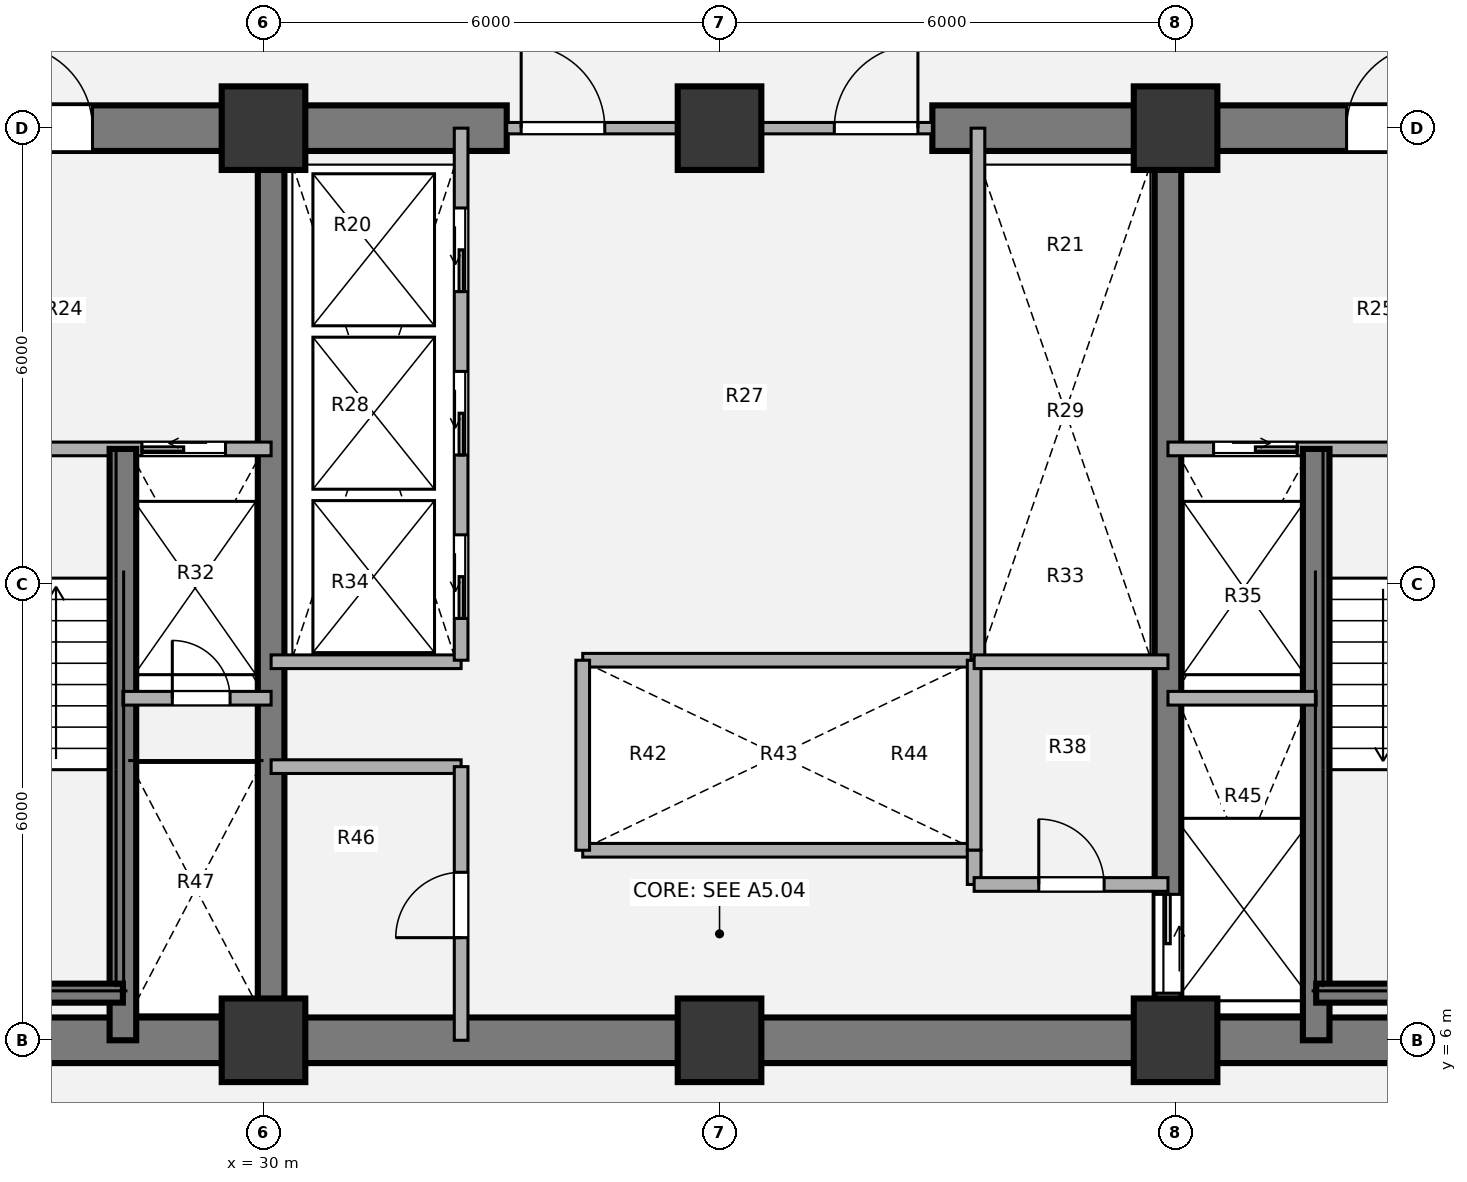
"""IFC4 building model, lengths in metres.
Left out: names, types, materials, properties, quantities, classifications, styles, units other than length and angle.
Written with IfcOpenShell. Run it as: python <this file> out.ifc"""

import sys

from ifc_helpers import new_model, si_unit, direction, frame, frame_2d, origin, origin_2d, place, context, subcontext, project, spatial, rectangle, extrude, source, transform, mapped, element, fill, save


model = new_model("IFC4")
c1 = context("Model", 3, precision=1e-05, world=origin(), true_north=direction((0.0, 1.0)))
c2 = subcontext(c1, "Body", "Model", "MODEL_VIEW")
j1 = project(units=[si_unit("LENGTHUNIT", "METRE"), si_unit("PLANEANGLEUNIT", "RADIAN")], contexts=[c1])
p1 = place(None, origin())
s1 = spatial("IfcSite", under=j1, at=p1, CompositionType="ELEMENT")
p2 = place(p1, origin())
s2 = spatial("IfcBuilding", under=s1, at=p2, CompositionType="ELEMENT")
p3 = place(p2, frame((0.0, 0.0, 38.34)))
s3 = spatial("IfcBuildingStorey", under=s2, at=p3, CompositionType="ELEMENT", Elevation=38.34)
m1 = source(origin(), c2, "Body", "SweptSolid", [
    extrude(rectangle(XDim=1.1, YDim=1.1, at=origin_2d()), origin(), (0.0, 0.0, 1.0), 3.78),
])
for number, where, z_axis, x_axis in (
    (1, (30.0, 6.0, 0.0), (0.0, 0.0, 1.0), (1.0, 0.0, 0.0)),
    (2, (36.0, 6.0, 0.0), (0.0, 0.0, 1.0), (1.0, 0.0, 0.0)),
    (3, (42.0, 6.0, 0.0), (0.0, 0.0, 1.0), (1.0, 0.0, 0.0)),
    (4, (30.0, 18.0, 0.0), (0.0, 0.0, 1.0), (1.0, 0.0, 0.0)),
    (5, (36.0, 18.0, 0.0), (0.0, 0.0, 1.0), (1.0, 0.0, 0.0)),
    (6, (42.0, 18.0, 0.0), (0.0, 0.0, 1.0), (1.0, 0.0, 0.0)),
):
    element("IfcColumn", number, at=place(p3, frame(where, z_axis=z_axis, x_axis=x_axis)), inside=s3, PredefinedType="COLUMN", context=c2, shape_type="MappedRepresentation", body=[
        mapped(m1, transform((0.0, 0.0, 0.0), x_axis=(1.0, 0.0, 0.0), y_axis=(0.0, 1.0, 0.0), z_axis=(0.0, 0.0, 1.0), scale=1.0)),
    ])
p4 = place(p3, frame((48.3, 6.0, 0.0), z_axis=(0.0, 0.0, 1.0), x_axis=(-1.0, 0.0, 0.0)))
e7 = element("IfcWall", 7, at=p4, inside=s3, PredefinedType="SHEAR", context=c2, shape_type="SweptSolid", body=[
    extrude(rectangle(XDim=24.6, YDim=0.6, at=frame_2d((12.3, 0.0))), origin(), (0.0, 0.0, 1.0), 3.78),
])
p5 = place(p3, frame((23.7, 18.0, 0.0), z_axis=(0.0, 0.0, 1.0), x_axis=(1.0, 0.0, 0.0)))
e8 = element("IfcWall", 8, at=p5, inside=s3, PredefinedType="SHEAR", context=c2, shape_type="SweptSolid", body=[
    extrude(rectangle(XDim=9.5, YDim=0.6, at=frame_2d((4.75, 0.0))), origin(), (0.0, 0.0, 1.0), 3.78),
])
p6 = place(p5, frame((2.95, 0.0, 0.0)))
e9 = element("IfcOpeningElement", 9, at=p6, cuts=e8, PredefinedType="OPENING", context=c2, shape_type="SweptSolid", body=[
    extrude(rectangle(XDim=1.1, YDim=2.1, at=origin_2d()), frame((0.55, 0.31, 1.05), z_axis=(0.0, -1.0, 0.0), x_axis=(1.0, 0.0, 0.0)), (0.0, 0.0, 1.0), 0.62),
])
p7 = place(p3, frame((38.8, 18.0, 0.0), z_axis=(0.0, 0.0, 1.0), x_axis=(1.0, 0.0, 0.0)))
e10 = element("IfcWall", 10, at=p7, inside=s3, PredefinedType="SHEAR", context=c2, shape_type="SweptSolid", body=[
    extrude(rectangle(XDim=9.5, YDim=0.6, at=frame_2d((4.75, 0.0))), origin(), (0.0, 0.0, 1.0), 3.78),
])
p8 = place(p7, frame((5.45, 0.0, 0.0)))
e11 = element("IfcOpeningElement", 11, at=p8, cuts=e10, PredefinedType="OPENING", context=c2, shape_type="SweptSolid", body=[
    extrude(rectangle(XDim=1.1, YDim=2.1, at=origin_2d()), frame((0.55, 0.31, 1.05), z_axis=(0.0, -1.0, 0.0), x_axis=(1.0, 0.0, 0.0)), (0.0, 0.0, 1.0), 0.62),
])
p9 = place(p3, frame((30.1, 6.0, 0.0), z_axis=(0.0, 0.0, 1.0), x_axis=(0.0, 1.0, 0.0)))
e12 = element("IfcWall", 12, at=p9, inside=s3, PredefinedType="SHEAR", context=c2, shape_type="SweptSolid", body=[
    extrude(rectangle(XDim=12.0, YDim=0.35, at=frame_2d((6.0, 0.0))), origin(), (0.0, 0.0, 1.0), 3.78),
])
p10 = place(p3, frame((41.9, 18.0, 0.0), z_axis=(0.0, 0.0, 1.0), x_axis=(0.0, -1.0, 0.0)))
e13 = element("IfcWall", 13, at=p10, inside=s3, PredefinedType="SHEAR", context=c2, shape_type="SweptSolid", body=[
    extrude(rectangle(XDim=12.0, YDim=0.35, at=frame_2d((6.0, 0.0))), origin(), (0.0, 0.0, 1.0), 3.78),
])
p11 = place(p10, frame((10.08, 0.0, 0.0)))
e14 = element("IfcOpeningElement", 14, at=p11, cuts=e13, PredefinedType="OPENING", context=c2, shape_type="SweptSolid", body=[
    extrude(rectangle(XDim=1.3, YDim=2.1, at=origin_2d()), frame((0.65, 0.185, 1.05), z_axis=(0.0, -1.0, 0.0), x_axis=(1.0, 0.0, 0.0)), (0.0, 0.0, 1.0), 0.37),
])
for number, where, z_axis, x_axis in (
    (15, (34.2, 11.0, 0.0), (0.0, 0.0, 1.0), (1.0, 0.0, 0.0)),
    (16, (34.2, 8.5, 0.0), (0.0, 0.0, 1.0), (1.0, 0.0, 0.0)),
):
    element("IfcWall", number, at=place(p3, frame(where, z_axis=z_axis, x_axis=x_axis)), inside=s3, PredefinedType="PARTITIONING", context=c2, shape_type="SweptSolid", body=[
        extrude(rectangle(XDim=5.15, YDim=0.18, at=frame_2d((2.575, 0.0))), origin(), (0.0, 0.0, 1.0), 3.5),
    ])
for number, where, z_axis, x_axis in (
    (17, (34.2, 8.5, 0.0), (0.0, 0.0, 1.0), (0.0, 1.0, 0.0)),
    (18, (39.35, 8.5, 0.0), (0.0, 0.0, 1.0), (0.0, 1.0, 0.0)),
):
    element("IfcWall", number, at=place(p3, frame(where, z_axis=z_axis, x_axis=x_axis)), inside=s3, PredefinedType="PARTITIONING", context=c2, shape_type="SweptSolid", body=[
        extrude(rectangle(XDim=2.5, YDim=0.18, at=frame_2d((1.25, 0.0))), origin(), (0.0, 0.0, 1.0), 3.5),
    ])
p12 = place(p3, frame((39.4, 11.0, 0.0), z_axis=(0.0, 0.0, 1.0), x_axis=(0.0, 1.0, 0.0)))
e19 = element("IfcWall", 19, at=p12, inside=s3, PredefinedType="PARTITIONING", context=c2, shape_type="SweptSolid", body=[
    extrude(rectangle(XDim=7.0, YDim=0.18, at=frame_2d((3.5, 0.0))), origin(), (0.0, 0.0, 1.0), 3.5),
])
for number, where, z_axis, x_axis in (
    (20, (30.1, 10.98, 0.0), (0.0, 0.0, 1.0), (1.0, 0.0, 0.0)),
    (21, (30.1, 9.6, 0.0), (0.0, 0.0, 1.0), (1.0, 0.0, 0.0)),
):
    element("IfcWall", number, at=place(p3, frame(where, z_axis=z_axis, x_axis=x_axis)), inside=s3, PredefinedType="PARTITIONING", context=c2, shape_type="SweptSolid", body=[
        extrude(rectangle(XDim=2.5, YDim=0.18, at=frame_2d((1.25, 0.0))), origin(), (0.0, 0.0, 1.0), 3.5),
    ])
p13 = place(p3, frame((32.6, 6.0, 0.0), z_axis=(0.0, 0.0, 1.0), x_axis=(0.0, 1.0, 0.0)))
e22 = element("IfcWall", 22, at=p13, inside=s3, PredefinedType="PARTITIONING", context=c2, shape_type="SweptSolid", body=[
    extrude(rectangle(XDim=3.6, YDim=0.18, at=frame_2d((1.8, 0.0))), origin(), (0.0, 0.0, 1.0), 3.5),
])
p14 = place(p13, frame((1.35, 0.0, 0.0)))
e23 = element("IfcOpeningElement", 23, at=p14, cuts=e22, PredefinedType="OPENING", context=c2, shape_type="SweptSolid", body=[
    extrude(rectangle(XDim=0.86, YDim=2.1, at=origin_2d()), frame((0.43, 0.1, 1.05), z_axis=(0.0, -1.0, 0.0), x_axis=(1.0, 0.0, 0.0)), (0.0, 0.0, 1.0), 0.2),
])
p15 = place(p3, frame((39.35, 10.98, 0.0), z_axis=(0.0, 0.0, 1.0), x_axis=(1.0, 0.0, 0.0)))
e24 = element("IfcWall", 24, at=p15, inside=s3, PredefinedType="PARTITIONING", context=c2, shape_type="SweptSolid", body=[
    extrude(rectangle(XDim=2.55, YDim=0.18, at=frame_2d((1.275, 0.0))), origin(), (0.0, 0.0, 1.0), 3.5),
])
p16 = place(p3, frame((39.35, 8.05, 0.0), z_axis=(0.0, 0.0, 1.0), x_axis=(0.0, 1.0, 0.0)))
e25 = element("IfcWall", 25, at=p16, inside=s3, PredefinedType="PARTITIONING", context=c2, shape_type="SweptSolid", body=[
    extrude(rectangle(XDim=0.45, YDim=0.18, at=frame_2d((0.225, 0.0))), origin(), (0.0, 0.0, 1.0), 3.5),
])
p17 = place(p3, frame((39.35, 8.05, 0.0), z_axis=(0.0, 0.0, 1.0), x_axis=(1.0, 0.0, 0.0)))
e26 = element("IfcWall", 26, at=p17, inside=s3, PredefinedType="PARTITIONING", context=c2, shape_type="SweptSolid", body=[
    extrude(rectangle(XDim=2.55, YDim=0.18, at=frame_2d((1.275, 0.0))), origin(), (0.0, 0.0, 1.0), 3.5),
])
p18 = place(p17, frame((0.85, 0.0, 0.0)))
e27 = element("IfcOpeningElement", 27, at=p18, cuts=e26, PredefinedType="OPENING", context=c2, shape_type="SweptSolid", body=[
    extrude(rectangle(XDim=0.86, YDim=2.1, at=origin_2d()), frame((0.43, 0.1, 1.05), z_axis=(0.0, -1.0, 0.0), x_axis=(1.0, 0.0, 0.0)), (0.0, 0.0, 1.0), 0.2),
])
p19 = place(p3, frame((33.2, 18.0, 0.0), z_axis=(0.0, 0.0, 1.0), x_axis=(1.0, 0.0, 0.0)))
e28 = element("IfcWall", 28, at=p19, inside=s3, PredefinedType="PARTITIONING", context=c2, shape_type="SweptSolid", body=[
    extrude(rectangle(XDim=5.6, YDim=0.15, at=frame_2d((2.8, 0.0))), origin(), (0.0, 0.0, 1.0), 2.315),
])
p20 = place(p19, frame((0.19, 0.0, 0.0)))
e29 = element("IfcOpeningElement", 29, at=p20, cuts=e28, PredefinedType="OPENING", context=c2, shape_type="SweptSolid", body=[
    extrude(rectangle(XDim=1.1, YDim=2.1, at=origin_2d()), frame((0.55, 0.085, 1.05), z_axis=(0.0, -1.0, 0.0), x_axis=(1.0, 0.0, 0.0)), (0.0, 0.0, 1.0), 0.17),
])
p21 = place(p19, frame((4.31, 0.0, 0.0)))
e30 = element("IfcOpeningElement", 30, at=p21, cuts=e28, PredefinedType="OPENING", context=c2, shape_type="SweptSolid", body=[
    extrude(rectangle(XDim=1.1, YDim=2.1, at=origin_2d()), frame((0.55, 0.085, 1.05), z_axis=(0.0, -1.0, 0.0), x_axis=(1.0, 0.0, 0.0)), (0.0, 0.0, 1.0), 0.17),
])
p22 = place(p3, frame((24.0, 13.78, 0.0), z_axis=(0.0, 0.0, 1.0), x_axis=(1.0, 0.0, 0.0)))
e31 = element("IfcWall", 31, at=p22, inside=s3, PredefinedType="PARTITIONING", context=c2, shape_type="SweptSolid", body=[
    extrude(rectangle(XDim=6.1, YDim=0.18, at=frame_2d((3.05, 0.0))), origin(), (0.0, 0.0, 1.0), 3.5),
])
p23 = place(p22, frame((1.15, 0.0, 0.0)))
e32 = element("IfcOpeningElement", 32, at=p23, cuts=e31, PredefinedType="OPENING", context=c2, shape_type="SweptSolid", body=[
    extrude(rectangle(XDim=1.1, YDim=2.1, at=origin_2d()), frame((0.55, 0.1, 1.05), z_axis=(0.0, -1.0, 0.0), x_axis=(1.0, 0.0, 0.0)), (0.0, 0.0, 1.0), 0.2),
])
p24 = place(p22, frame((4.4, 0.0, 0.0)))
e33 = element("IfcOpeningElement", 33, at=p24, cuts=e31, PredefinedType="OPENING", context=c2, shape_type="SweptSolid", body=[
    extrude(rectangle(XDim=1.1, YDim=2.1, at=origin_2d()), frame((0.55, 0.1, 1.05), z_axis=(0.0, -1.0, 0.0), x_axis=(1.0, 0.0, 0.0)), (0.0, 0.0, 1.0), 0.2),
])
p25 = place(p3, frame((28.15, 6.0, 0.0), z_axis=(0.0, 0.0, 1.0), x_axis=(0.0, 1.0, 0.0)))
e34 = element("IfcWall", 34, at=p25, inside=s3, PredefinedType="SHEAR", context=c2, shape_type="SweptSolid", body=[
    extrude(rectangle(XDim=7.78, YDim=0.35, at=frame_2d((3.89, 0.0))), origin(), (0.0, 0.0, 1.0), 3.85),
])
p26 = place(p3, frame((24.58, 6.62, 0.0), z_axis=(0.0, 0.0, 1.0), x_axis=(1.0, 0.0, 0.0)))
e35 = element("IfcWall", 35, at=p26, inside=s3, PredefinedType="SHEAR", context=c2, shape_type="SweptSolid", body=[
    extrude(rectangle(XDim=3.57, YDim=0.25, at=frame_2d((1.785, 0.0))), origin(), (0.0, 0.0, 1.0), 3.85),
])
p27 = place(p3, frame((28.15, 10.5, 0.0), z_axis=(0.0, 0.0, 1.0), x_axis=(1.0, 0.0, 0.0)))
e36 = element("IfcWall", 36, at=p27, inside=s3, PredefinedType="PARTITIONING", context=c2, shape_type="SweptSolid", body=[
    extrude(rectangle(XDim=1.95, YDim=0.18, at=frame_2d((0.975, 0.0))), origin(), (0.0, 0.0, 1.0), 3.5),
])
p28 = place(p27, frame((0.65, 0.0, 0.0)))
e37 = element("IfcOpeningElement", 37, at=p28, cuts=e36, PredefinedType="OPENING", context=c2, shape_type="SweptSolid", body=[
    extrude(rectangle(XDim=0.76, YDim=2.05, at=origin_2d()), frame((0.38, 0.1, 1.025), z_axis=(0.0, -1.0, 0.0), x_axis=(1.0, 0.0, 0.0)), (0.0, 0.0, 1.0), 0.2),
])
p29 = place(p3, frame((41.9, 13.78, 0.0), z_axis=(0.0, 0.0, 1.0), x_axis=(1.0, 0.0, 0.0)))
e38 = element("IfcWall", 38, at=p29, inside=s3, PredefinedType="PARTITIONING", context=c2, shape_type="SweptSolid", body=[
    extrude(rectangle(XDim=6.1, YDim=0.18, at=frame_2d((3.05, 0.0))), origin(), (0.0, 0.0, 1.0), 3.5),
])
p30 = place(p29, frame((0.6, 0.0, 0.0)))
e39 = element("IfcOpeningElement", 39, at=p30, cuts=e38, PredefinedType="OPENING", context=c2, shape_type="SweptSolid", body=[
    extrude(rectangle(XDim=1.1, YDim=2.1, at=origin_2d()), frame((0.55, 0.1, 1.05), z_axis=(0.0, -1.0, 0.0), x_axis=(1.0, 0.0, 0.0)), (0.0, 0.0, 1.0), 0.2),
])
p31 = place(p29, frame((3.8, 0.0, 0.0)))
e40 = element("IfcOpeningElement", 40, at=p31, cuts=e38, PredefinedType="OPENING", context=c2, shape_type="SweptSolid", body=[
    extrude(rectangle(XDim=1.1, YDim=2.1, at=origin_2d()), frame((0.55, 0.1, 1.05), z_axis=(0.0, -1.0, 0.0), x_axis=(1.0, 0.0, 0.0)), (0.0, 0.0, 1.0), 0.2),
])
p32 = place(p3, frame((43.85, 6.0, 0.0), z_axis=(0.0, 0.0, 1.0), x_axis=(0.0, 1.0, 0.0)))
e41 = element("IfcWall", 41, at=p32, inside=s3, PredefinedType="SHEAR", context=c2, shape_type="SweptSolid", body=[
    extrude(rectangle(XDim=7.78, YDim=0.35, at=frame_2d((3.89, 0.0))), origin(), (0.0, 0.0, 1.0), 3.85),
])
p33 = place(p3, frame((43.85, 6.62, 0.0), z_axis=(0.0, 0.0, 1.0), x_axis=(1.0, 0.0, 0.0)))
e42 = element("IfcWall", 42, at=p33, inside=s3, PredefinedType="SHEAR", context=c2, shape_type="SweptSolid", body=[
    extrude(rectangle(XDim=3.57, YDim=0.25, at=frame_2d((1.785, 0.0))), origin(), (0.0, 0.0, 1.0), 3.85),
])
p34 = place(p3, frame((41.9, 10.5, 0.0), z_axis=(0.0, 0.0, 1.0), x_axis=(1.0, 0.0, 0.0)))
e43 = element("IfcWall", 43, at=p34, inside=s3, PredefinedType="PARTITIONING", context=c2, shape_type="SweptSolid", body=[
    extrude(rectangle(XDim=1.95, YDim=0.18, at=frame_2d((0.975, 0.0))), origin(), (0.0, 0.0, 1.0), 3.5),
])
p35 = place(p3, frame((32.6, 11.0, 0.0), z_axis=(0.0, 0.0, 1.0), x_axis=(0.0, 1.0, 0.0)))
e44 = element("IfcWall", 44, at=p35, inside=s3, PredefinedType="PARTITIONING", context=c2, shape_type="SweptSolid", body=[
    extrude(rectangle(XDim=7.0, YDim=0.18, at=frame_2d((3.5, 0.0))), origin(), (0.0, 0.0, 1.0), 3.5),
])
p36 = place(p35, frame((0.55, 0.0, 0.0)))
e45 = element("IfcOpeningElement", 45, at=p36, cuts=e44, PredefinedType="OPENING", context=c2, shape_type="SweptSolid", body=[
    extrude(rectangle(XDim=1.1, YDim=2.1, at=origin_2d()), frame((0.55, 0.1, 1.05), z_axis=(0.0, -1.0, 0.0), x_axis=(1.0, 0.0, 0.0)), (0.0, 0.0, 1.0), 0.2),
])
p37 = place(p35, frame((2.7, 0.0, 0.0)))
e46 = element("IfcOpeningElement", 46, at=p37, cuts=e44, PredefinedType="OPENING", context=c2, shape_type="SweptSolid", body=[
    extrude(rectangle(XDim=1.1, YDim=2.1, at=origin_2d()), frame((0.55, 0.1, 1.05), z_axis=(0.0, -1.0, 0.0), x_axis=(1.0, 0.0, 0.0)), (0.0, 0.0, 1.0), 0.2),
])
p38 = place(p35, frame((4.85, 0.0, 0.0)))
e47 = element("IfcOpeningElement", 47, at=p38, cuts=e44, PredefinedType="OPENING", context=c2, shape_type="SweptSolid", body=[
    extrude(rectangle(XDim=1.1, YDim=2.1, at=origin_2d()), frame((0.55, 0.1, 1.05), z_axis=(0.0, -1.0, 0.0), x_axis=(1.0, 0.0, 0.0)), (0.0, 0.0, 1.0), 0.2),
])
m2 = source(origin(), c2, "Body", "SweptSolid", [
    extrude(rectangle(XDim=0.86, YDim=2.1, at=origin_2d()), frame((0.43, 0.025, 1.05), z_axis=(0.0, -1.0, 0.0), x_axis=(1.0, 0.0, 0.0)), (0.0, 0.0, 1.0), 0.05),
])
p39 = place(p14, origin())
e48 = element("IfcDoor", 48, at=p39, inside=s3, OperationType="SINGLE_SWING_LEFT", PredefinedType="DOOR", context=c2, shape_type="MappedRepresentation", body=[
    mapped(m2, transform((0.0, 0.0, 0.0), x_axis=(1.0, 0.0, 0.0), y_axis=(0.0, 1.0, 0.0), z_axis=(0.0, 0.0, 1.0), scale=1.0)),
])
fill(e23, e48)
p40 = place(p18, origin())
e49 = element("IfcDoor", 49, at=p40, inside=s3, OperationType="SINGLE_SWING_LEFT", PredefinedType="DOOR", context=c2, shape_type="MappedRepresentation", body=[
    mapped(m2, transform((0.0, 0.0, 0.0), x_axis=(1.0, 0.0, 0.0), y_axis=(0.0, 1.0, 0.0), z_axis=(0.0, 0.0, 1.0), scale=1.0)),
])
fill(e27, e49)
m3 = source(origin(), c2, "Body", "SweptSolid", [
    extrude(rectangle(XDim=1.1, YDim=2.1, at=origin_2d()), frame((0.55, 0.025, 1.05), z_axis=(0.0, -1.0, 0.0), x_axis=(1.0, 0.0, 0.0)), (0.0, 0.0, 1.0), 0.05),
])
p41 = place(p20, origin())
e50 = element("IfcDoor", 50, at=p41, inside=s3, OperationType="SINGLE_SWING_LEFT", PredefinedType="DOOR", context=c2, shape_type="MappedRepresentation", body=[
    mapped(m3, transform((0.0, 0.0, 0.0), x_axis=(1.0, 0.0, 0.0), y_axis=(0.0, 1.0, 0.0), z_axis=(0.0, 0.0, 1.0), scale=1.0)),
])
fill(e29, e50)
p42 = place(p21, origin())
e51 = element("IfcDoor", 51, at=p42, inside=s3, OperationType="SINGLE_SWING_RIGHT", PredefinedType="DOOR", context=c2, shape_type="MappedRepresentation", body=[
    mapped(m3, transform((0.0, 0.0, 0.0), x_axis=(1.0, 0.0, 0.0), y_axis=(0.0, 1.0, 0.0), z_axis=(0.0, 0.0, 1.0), scale=1.0)),
])
fill(e30, e51)
m4 = source(origin(), c2, "Body", "SweptSolid", [
    extrude(rectangle(XDim=1.1, YDim=2.1, at=origin_2d()), frame((0.55, 0.025, 1.05), z_axis=(0.0, -1.0, 0.0), x_axis=(1.0, 0.0, 0.0)), (0.0, 0.0, 1.0), 0.05),
])
p43 = place(p24, origin())
e52 = element("IfcDoor", 52, at=p43, inside=s3, OperationType="SLIDING_TO_LEFT", PredefinedType="DOOR", context=c2, shape_type="MappedRepresentation", body=[
    mapped(m4, transform((0.0, 0.0, 0.0), x_axis=(1.0, 0.0, 0.0), y_axis=(0.0, 1.0, 0.0), z_axis=(0.0, 0.0, 1.0), scale=1.0)),
])
fill(e33, e52)
m5 = source(origin(), c2, "Body", "SweptSolid", [
    extrude(rectangle(XDim=0.76, YDim=2.05, at=origin_2d()), frame((0.38, 0.025, 1.025), z_axis=(0.0, -1.0, 0.0), x_axis=(1.0, 0.0, 0.0)), (0.0, 0.0, 1.0), 0.05),
])
p44 = place(p28, origin())
e53 = element("IfcDoor", 53, at=p44, inside=s3, OperationType="SINGLE_SWING_LEFT", PredefinedType="DOOR", context=c2, shape_type="MappedRepresentation", body=[
    mapped(m5, transform((0.0, 0.0, 0.0), x_axis=(1.0, 0.0, 0.0), y_axis=(0.0, 1.0, 0.0), z_axis=(0.0, 0.0, 1.0), scale=1.0)),
])
fill(e37, e53)
p45 = place(p30, origin())
e54 = element("IfcDoor", 54, at=p45, inside=s3, OperationType="SLIDING_TO_RIGHT", PredefinedType="DOOR", context=c2, shape_type="MappedRepresentation", body=[
    mapped(m4, transform((0.0, 0.0, 0.0), x_axis=(1.0, 0.0, 0.0), y_axis=(0.0, 1.0, 0.0), z_axis=(0.0, 0.0, 1.0), scale=1.0)),
])
fill(e39, e54)
m6 = source(origin(), c2, "Body", "SweptSolid", [
    extrude(rectangle(XDim=1.3, YDim=2.1, at=origin_2d()), frame((0.65, 0.025, 1.05), z_axis=(0.0, -1.0, 0.0), x_axis=(1.0, 0.0, 0.0)), (0.0, 0.0, 1.0), 0.05),
])
p46 = place(p11, origin())
e55 = element("IfcDoor", 55, at=p46, inside=s3, OperationType="SLIDING_TO_LEFT", PredefinedType="DOOR", context=c2, shape_type="MappedRepresentation", body=[
    mapped(m6, transform((0.0, 0.0, 0.0), x_axis=(1.0, 0.0, 0.0), y_axis=(0.0, 1.0, 0.0), z_axis=(0.0, 0.0, 1.0), scale=1.0)),
])
fill(e14, e55)
p47 = place(p6, origin())
e56 = element("IfcDoor", 56, at=p47, inside=s3, OperationType="SINGLE_SWING_LEFT", PredefinedType="DOOR", context=c2, shape_type="MappedRepresentation", body=[
    mapped(m3, transform((0.0, 0.0, 0.0), x_axis=(1.0, 0.0, 0.0), y_axis=(0.0, 1.0, 0.0), z_axis=(0.0, 0.0, 1.0), scale=1.0)),
])
fill(e9, e56)
p48 = place(p8, origin())
e57 = element("IfcDoor", 57, at=p48, inside=s3, OperationType="SINGLE_SWING_RIGHT", PredefinedType="DOOR", context=c2, shape_type="MappedRepresentation", body=[
    mapped(m3, transform((0.0, 0.0, 0.0), x_axis=(1.0, 0.0, 0.0), y_axis=(0.0, 1.0, 0.0), z_axis=(0.0, 0.0, 1.0), scale=1.0)),
])
fill(e11, e57)
p49 = place(p36, origin())
e58 = element("IfcDoor", 58, at=p49, inside=s3, OperationType="SLIDING_TO_LEFT", PredefinedType="DOOR", context=c2, shape_type="MappedRepresentation", body=[
    mapped(m4, transform((0.0, 0.0, 0.0), x_axis=(1.0, 0.0, 0.0), y_axis=(0.0, 1.0, 0.0), z_axis=(0.0, 0.0, 1.0), scale=1.0)),
])
fill(e45, e58)
p50 = place(p37, origin())
e59 = element("IfcDoor", 59, at=p50, inside=s3, OperationType="SLIDING_TO_LEFT", PredefinedType="DOOR", context=c2, shape_type="MappedRepresentation", body=[
    mapped(m4, transform((0.0, 0.0, 0.0), x_axis=(1.0, 0.0, 0.0), y_axis=(0.0, 1.0, 0.0), z_axis=(0.0, 0.0, 1.0), scale=1.0)),
])
fill(e46, e59)
p51 = place(p38, origin())
e60 = element("IfcDoor", 60, at=p51, inside=s3, OperationType="SLIDING_TO_LEFT", PredefinedType="DOOR", context=c2, shape_type="MappedRepresentation", body=[
    mapped(m4, transform((0.0, 0.0, 0.0), x_axis=(1.0, 0.0, 0.0), y_axis=(0.0, 1.0, 0.0), z_axis=(0.0, 0.0, 1.0), scale=1.0)),
])
fill(e47, e60)
save(model, sys.argv[1])
